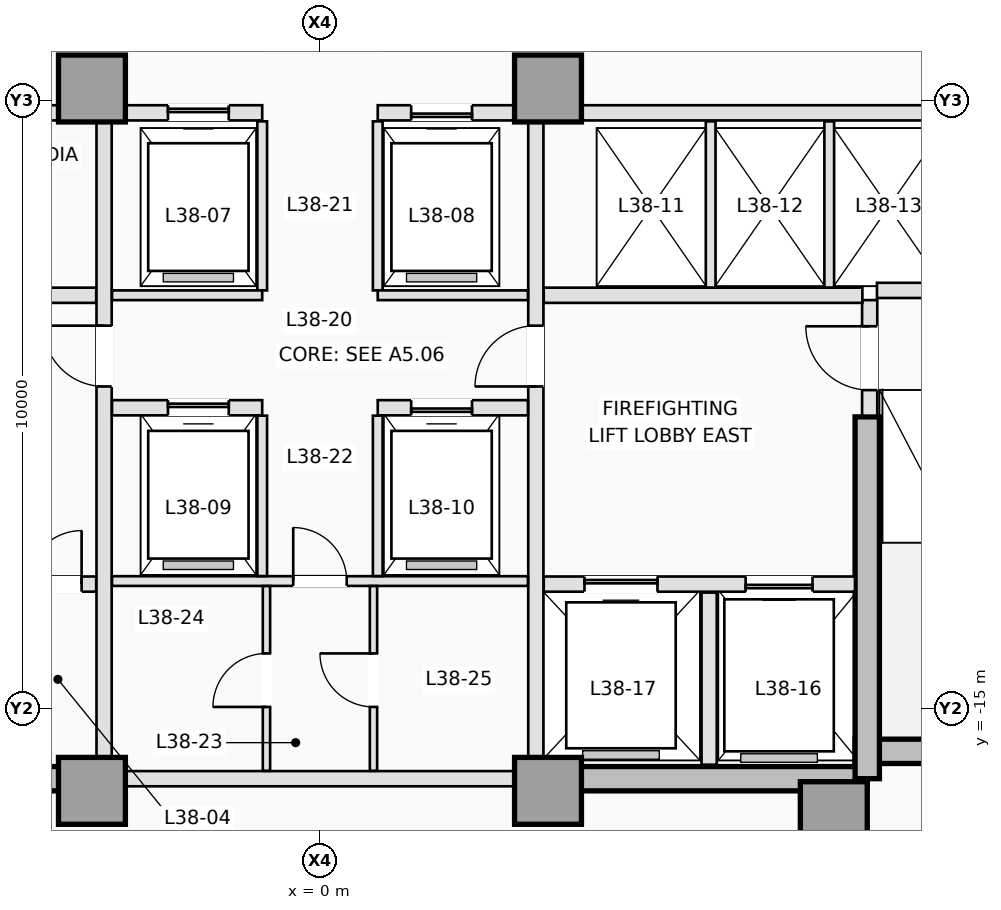
"""IFC4 building model, lengths in metres.
Left out: names, types, materials, properties, quantities, classifications, styles, units other than length and angle.
Written with IfcOpenShell. Run it as: python <this file> out.ifc"""

import sys

from ifc_helpers import new_model, si_unit, direction, frame, frame_2d, origin, origin_2d, place, context, subcontext, project, spatial, rectangle, extrude, element, fill, save


model = new_model("IFC4")
c1 = context("Model", 3, precision=1e-05, world=origin(), true_north=direction((0.0, 1.0)))
c2 = subcontext(c1, "Body", "Model", "MODEL_VIEW")
j1 = project(units=[si_unit("LENGTHUNIT", "METRE"), si_unit("PLANEANGLEUNIT", "RADIAN")], contexts=[c1])
p1 = place(None, origin())
s1 = spatial("IfcSite", under=j1, at=p1, CompositionType="ELEMENT")
p2 = place(p1, origin())
s2 = spatial("IfcBuilding", under=s1, at=p2, CompositionType="ELEMENT")
p3 = place(p2, frame((0.0, 0.0, 140.5)))
s3 = spatial("IfcBuildingStorey", under=s2, at=p3, CompositionType="ELEMENT", Elevation=140.5)
for number, where, z_axis, x_axis in (
    (1, (-9.0, -16.15, 0.0), (0.0, 0.0, 1.0), (1.0, 0.0, 0.0)),
    (2, (3.75, -16.15, 0.0), (0.0, 0.0, 1.0), (1.0, 0.0, 0.0)),
):
    element("IfcWall", number, at=place(p3, frame(where, z_axis=z_axis, x_axis=x_axis)), inside=s3, PredefinedType="SHEAR", context=c2, shape_type="SweptSolid", body=[
        extrude(rectangle(XDim=5.25, YDim=0.4, at=frame_2d((2.625, 0.0))), origin(), (0.0, 0.0, 1.0), 3.5),
    ])
p4 = place(p3, frame((8.8, -15.7, 0.0), z_axis=(0.0, 0.0, 1.0), x_axis=(1.0, 0.0, 0.0)))
e3 = element("IfcWall", 3, at=p4, inside=s3, PredefinedType="SHEAR", context=c2, shape_type="SweptSolid", body=[
    extrude(rectangle(XDim=3.8, YDim=0.4, at=frame_2d((1.9, 0.0))), origin(), (0.0, 0.0, 1.0), 3.5),
])
p5 = place(p3, frame((9.0, -16.15, 0.0), z_axis=(0.0, 0.0, 1.0), x_axis=(0.0, 1.0, 0.0)))
e4 = element("IfcWall", 4, at=p5, inside=s3, PredefinedType="SHEAR", context=c2, shape_type="SweptSolid", body=[
    extrude(rectangle(XDim=5.95, YDim=0.4, at=frame_2d((2.975, 0.0))), origin(), (0.0, 0.0, 1.0), 3.5),
])
for number, where, z_axis, x_axis in (
    (5, (-3.75, -16.35, 0.0), (0.0, 0.0, 1.0), (1.0, 0.0, 0.0)),
    (6, (3.75, -16.35, 0.0), (0.0, 0.0, 1.0), (1.0, 0.0, 0.0)),
    (7, (8.45, -16.75, 0.0), (0.0, 0.0, 1.0), (1.0, 0.0, 0.0)),
    (8, (-3.75, -4.8, 0.0), (0.0, 0.0, 1.0), (1.0, 0.0, 0.0)),
    (9, (3.75, -4.8, 0.0), (0.0, 0.0, 1.0), (1.0, 0.0, 0.0)),
):
    element("IfcColumn", number, at=place(p3, frame(where, z_axis=z_axis, x_axis=x_axis)), inside=s3, PredefinedType="COLUMN", context=c2, shape_type="SweptSolid", body=[
        extrude(rectangle(XDim=1.1, YDim=1.1, at=origin_2d()), origin(), (0.0, 0.0, 1.0), 3.5),
    ])
p6 = place(p3, frame((9.04, -10.18, 0.0), z_axis=(0.0, 0.0, 1.0), x_axis=(0.0, 1.0, 0.0)))
e10 = element("IfcWall", 10, at=p6, inside=s3, PredefinedType="PARTITIONING", context=c2, shape_type="SweptSolid", body=[
    extrude(rectangle(XDim=1.9, YDim=0.25, at=frame_2d((0.95, 0.0))), origin(), (0.0, 0.0, 1.0), 3.25),
])
p7 = place(p6, frame((0.42, 0.0, 0.0)))
e11 = element("IfcOpeningElement", 11, at=p7, cuts=e10, PredefinedType="OPENING", context=c2, shape_type="SweptSolid", body=[
    extrude(rectangle(XDim=1.05, YDim=2.15, at=frame_2d((0.525, 1.075))), frame((0.0, 0.135, 0.0), z_axis=(0.0, -1.0, 0.0), x_axis=(1.0, 0.0, 0.0)), (0.0, 0.0, 1.0), 0.27),
])
p8 = place(p3, frame((9.16, -8.12, 0.0), z_axis=(0.0, 0.0, 1.0), x_axis=(1.0, 0.0, 0.0)))
e12 = element("IfcWall", 12, at=p8, inside=s3, PredefinedType="PARTITIONING", context=c2, shape_type="SweptSolid", body=[
    extrude(rectangle(XDim=3.22, YDim=0.25, at=frame_2d((1.61, 0.0))), origin(), (0.0, 0.0, 1.0), 3.25),
])
p9 = place(p3, frame((-8.798, -12.95, 0.0), z_axis=(0.0, 0.0, 1.0), x_axis=(1.0, 0.0, 0.0)))
e13 = element("IfcWall", 13, at=p9, inside=s3, PredefinedType="PARTITIONING", context=c2, shape_type="SweptSolid", body=[
    extrude(rectangle(XDim=5.118, YDim=0.25, at=frame_2d((2.559, 0.0))), origin(), (0.0, 0.0, 1.0), 3.25),
])
p10 = place(p9, frame((0.698, 0.0, 0.0)))
e14 = element("IfcOpeningElement", 14, at=p10, cuts=e13, PredefinedType="OPENING", context=c2, shape_type="SweptSolid", body=[
    extrude(rectangle(XDim=1.1, YDim=2.15, at=frame_2d((0.55, 1.075))), frame((0.0, 0.135, 0.0), z_axis=(0.0, -1.0, 0.0), x_axis=(1.0, 0.0, 0.0)), (0.0, 0.0, 1.0), 0.27),
])
p11 = place(p9, frame((2.598, 0.0, 0.0)))
e15 = element("IfcOpeningElement", 15, at=p11, cuts=e13, PredefinedType="OPENING", context=c2, shape_type="SweptSolid", body=[
    extrude(rectangle(XDim=0.88, YDim=2.1, at=frame_2d((0.44, 1.05))), frame((0.0, 0.135, 0.0), z_axis=(0.0, -1.0, 0.0), x_axis=(1.0, 0.0, 0.0)), (0.0, 0.0, 1.0), 0.27),
])
p12 = place(p9, frame((3.998, 0.0, 0.0)))
e16 = element("IfcOpeningElement", 16, at=p12, cuts=e13, PredefinedType="OPENING", context=c2, shape_type="SweptSolid", body=[
    extrude(rectangle(XDim=0.88, YDim=2.1, at=frame_2d((0.44, 1.05))), frame((0.0, 0.135, 0.0), z_axis=(0.0, -1.0, 0.0), x_axis=(1.0, 0.0, 0.0)), (0.0, 0.0, 1.0), 0.27),
])
p13 = place(p3, frame((3.68, -12.95, 0.0), z_axis=(0.0, 0.0, 1.0), x_axis=(1.0, 0.0, 0.0)))
e17 = element("IfcWall", 17, at=p13, inside=s3, PredefinedType="PARTITIONING", context=c2, shape_type="SweptSolid", body=[
    extrude(rectangle(XDim=5.118, YDim=0.25, at=frame_2d((2.559, 0.0))), origin(), (0.0, 0.0, 1.0), 3.25),
])
p14 = place(p13, frame((3.32, 0.0, 0.0)))
e18 = element("IfcOpeningElement", 18, at=p14, cuts=e17, PredefinedType="OPENING", context=c2, shape_type="SweptSolid", body=[
    extrude(rectangle(XDim=1.1, YDim=2.15, at=frame_2d((0.55, 1.075))), frame((0.0, 0.135, 0.0), z_axis=(0.0, -1.0, 0.0), x_axis=(1.0, 0.0, 0.0)), (0.0, 0.0, 1.0), 0.27),
])
p15 = place(p13, frame((0.67, 0.0, 0.0)))
e19 = element("IfcOpeningElement", 19, at=p15, cuts=e17, PredefinedType="OPENING", context=c2, shape_type="SweptSolid", body=[
    extrude(rectangle(XDim=1.2, YDim=2.15, at=frame_2d((0.6, 1.075))), frame((0.0, 0.135, 0.0), z_axis=(0.0, -1.0, 0.0), x_axis=(1.0, 0.0, 0.0)), (0.0, 0.0, 1.0), 0.27),
])
p16 = place(p3, frame((6.4, -15.92, 0.0), z_axis=(0.0, 0.0, 1.0), x_axis=(0.0, 1.0, 0.0)))
e20 = element("IfcWall", 20, at=p16, inside=s3, PredefinedType="PARTITIONING", context=c2, shape_type="SweptSolid", body=[
    extrude(rectangle(XDim=2.83, YDim=0.25, at=frame_2d((1.415, 0.0))), origin(), (0.0, 0.0, 1.0), 3.25),
])
for number, where, z_axis, x_axis in (
    (21, (-8.92, -8.2, 0.0), (0.0, 0.0, 1.0), (1.0, 0.0, 0.0)),
    (22, (3.68, -8.2, 0.0), (0.0, 0.0, 1.0), (1.0, 0.0, 0.0)),
):
    element("IfcWall", number, at=place(p3, frame(where, z_axis=z_axis, x_axis=x_axis)), inside=s3, PredefinedType="PARTITIONING", context=c2, shape_type="SweptSolid", body=[
        extrude(rectangle(XDim=5.24, YDim=0.25, at=frame_2d((2.62, 0.0))), origin(), (0.0, 0.0, 1.0), 3.25),
    ])
p17 = place(p3, frame((-3.55, -15.798, 0.0), z_axis=(0.0, 0.0, 1.0), x_axis=(0.0, 1.0, 0.0)))
e23 = element("IfcWall", 23, at=p17, inside=s3, PredefinedType="PARTITIONING", context=c2, shape_type="SweptSolid", body=[
    extrude(rectangle(XDim=10.446, YDim=0.25, at=frame_2d((5.223, 0.0))), origin(), (0.0, 0.0, 1.0), 3.25),
])
p18 = place(p17, frame((6.098, 0.0, 0.0)))
e24 = element("IfcOpeningElement", 24, at=p18, cuts=e23, PredefinedType="OPENING", context=c2, shape_type="SweptSolid", body=[
    extrude(rectangle(XDim=1.0, YDim=2.15, at=frame_2d((0.5, 1.075))), frame((0.0, 0.135, 0.0), z_axis=(0.0, -1.0, 0.0), x_axis=(1.0, 0.0, 0.0)), (0.0, 0.0, 1.0), 0.27),
])
p19 = place(p3, frame((3.55, -15.798, 0.0), z_axis=(0.0, 0.0, 1.0), x_axis=(0.0, 1.0, 0.0)))
e25 = element("IfcWall", 25, at=p19, inside=s3, PredefinedType="PARTITIONING", context=c2, shape_type="SweptSolid", body=[
    extrude(rectangle(XDim=10.446, YDim=0.25, at=frame_2d((5.223, 0.0))), origin(), (0.0, 0.0, 1.0), 3.25),
])
p20 = place(p19, frame((6.098, 0.0, 0.0)))
e26 = element("IfcOpeningElement", 26, at=p20, cuts=e25, PredefinedType="OPENING", context=c2, shape_type="SweptSolid", body=[
    extrude(rectangle(XDim=1.0, YDim=2.15, at=frame_2d((0.5, 1.075))), frame((0.0, 0.135, 0.0), z_axis=(0.0, -1.0, 0.0), x_axis=(1.0, 0.0, 0.0)), (0.0, 0.0, 1.0), 0.27),
])
p21 = place(p3, frame((-12.398, -5.2, 0.0), z_axis=(0.0, 0.0, 1.0), x_axis=(1.0, 0.0, 0.0)))
e27 = element("IfcWall", 27, at=p21, inside=s3, PredefinedType="PARTITIONING", context=c2, shape_type="SweptSolid", body=[
    extrude(rectangle(XDim=8.096, YDim=0.25, at=frame_2d((4.048, 0.0))), origin(), (0.0, 0.0, 1.0), 3.25),
])
p22 = place(p21, frame((2.968, 0.0, 0.0)))
e28 = element("IfcOpeningElement", 28, at=p22, cuts=e27, PredefinedType="OPENING", context=c2, shape_type="SweptSolid", body=[
    extrude(rectangle(XDim=0.92, YDim=2.12, at=frame_2d((0.46, 1.06))), frame((0.0, 0.135, 0.0), z_axis=(0.0, -1.0, 0.0), x_axis=(1.0, 0.0, 0.0)), (0.0, 0.0, 1.0), 0.27),
])
p23 = place(p21, frame((6.068, 0.0, 0.0)))
e29 = element("IfcOpeningElement", 29, at=p23, cuts=e27, PredefinedType="OPENING", context=c2, shape_type="SweptSolid", body=[
    extrude(rectangle(XDim=0.92, YDim=2.12, at=frame_2d((0.46, 1.06))), frame((0.0, 0.135, 0.0), z_axis=(0.0, -1.0, 0.0), x_axis=(1.0, 0.0, 0.0)), (0.0, 0.0, 1.0), 0.27),
])
p24 = place(p3, frame((4.302, -5.2, 0.0), z_axis=(0.0, 0.0, 1.0), x_axis=(1.0, 0.0, 0.0)))
e30 = element("IfcWall", 30, at=p24, inside=s3, PredefinedType="PARTITIONING", context=c2, shape_type="SweptSolid", body=[
    extrude(rectangle(XDim=8.096, YDim=0.25, at=frame_2d((4.048, 0.0))), origin(), (0.0, 0.0, 1.0), 3.25),
])
p25 = place(p3, frame((-3.198, -5.2, 0.0), z_axis=(0.0, 0.0, 1.0), x_axis=(1.0, 0.0, 0.0)))
e31 = element("IfcWall", 31, at=p25, inside=s3, PredefinedType="PARTITIONING", context=c2, shape_type="SweptSolid", body=[
    extrude(rectangle(XDim=2.248, YDim=0.25, at=frame_2d((1.124, 0.0))), origin(), (0.0, 0.0, 1.0), 3.25),
])
p26 = place(p25, frame((0.698, 0.0, 0.0)))
e32 = element("IfcOpeningElement", 32, at=p26, cuts=e31, PredefinedType="OPENING", context=c2, shape_type="SweptSolid", body=[
    extrude(rectangle(XDim=1.0, YDim=2.15, at=frame_2d((0.5, 1.075))), frame((0.0, 0.135, 0.0), z_axis=(0.0, -1.0, 0.0), x_axis=(1.0, 0.0, 0.0)), (0.0, 0.0, 1.0), 0.27),
])
p27 = place(p3, frame((0.95, -5.2, 0.0), z_axis=(0.0, 0.0, 1.0), x_axis=(1.0, 0.0, 0.0)))
e33 = element("IfcWall", 33, at=p27, inside=s3, PredefinedType="PARTITIONING", context=c2, shape_type="SweptSolid", body=[
    extrude(rectangle(XDim=2.248, YDim=0.25, at=frame_2d((1.124, 0.0))), origin(), (0.0, 0.0, 1.0), 3.25),
])
p28 = place(p27, frame((0.55, 0.0, 0.0)))
e34 = element("IfcOpeningElement", 34, at=p28, cuts=e33, PredefinedType="OPENING", context=c2, shape_type="SweptSolid", body=[
    extrude(rectangle(XDim=1.0, YDim=2.15, at=frame_2d((0.5, 1.075))), frame((0.0, 0.135, 0.0), z_axis=(0.0, -1.0, 0.0), x_axis=(1.0, 0.0, 0.0)), (0.0, 0.0, 1.0), 0.27),
])
for number, where, z_axis, x_axis in (
    (35, (6.425, -8.073, 0.0), (0.0, 0.0, 1.0), (0.0, 1.0, 0.0)),
    (36, (8.375, -8.073, 0.0), (0.0, 0.0, 1.0), (0.0, 1.0, 0.0)),
):
    element("IfcWall", number, at=place(p3, frame(where, z_axis=z_axis, x_axis=x_axis)), inside=s3, PredefinedType="PARTITIONING", context=c2, shape_type="SweptSolid", body=[
        extrude(rectangle(XDim=2.733, YDim=0.16, at=frame_2d((1.366, 0.0))), origin(), (0.0, 0.0, 1.0), 3.25),
    ])
p29 = place(p3, frame((-3.198, -16.15, 0.0), z_axis=(0.0, 0.0, 1.0), x_axis=(1.0, 0.0, 0.0)))
e37 = element("IfcWall", 37, at=p29, inside=s3, PredefinedType="PARTITIONING", context=c2, shape_type="SweptSolid", body=[
    extrude(rectangle(XDim=6.396, YDim=0.25, at=frame_2d((3.198, 0.0))), origin(), (0.0, 0.0, 1.0), 2.45),
])
for number, where, z_axis, x_axis in (
    (38, (-0.95, -8.12, 0.0), (0.0, 0.0, 1.0), (0.0, 1.0, 0.0)),
    (39, (0.95, -8.12, 0.0), (0.0, 0.0, 1.0), (0.0, 1.0, 0.0)),
):
    element("IfcWall", number, at=place(p3, frame(where, z_axis=z_axis, x_axis=x_axis)), inside=s3, PredefinedType="PARTITIONING", context=c2, shape_type="SweptSolid", body=[
        extrude(rectangle(XDim=2.78, YDim=0.16, at=frame_2d((1.39, 0.0))), origin(), (0.0, 0.0, 1.0), 3.25),
    ])
for number, where, z_axis, x_axis in (
    (40, (-3.42, -8.2, 0.0), (0.0, 0.0, 1.0), (1.0, 0.0, 0.0)),
    (41, (0.95, -8.2, 0.0), (0.0, 0.0, 1.0), (1.0, 0.0, 0.0)),
):
    element("IfcWall", number, at=place(p3, frame(where, z_axis=z_axis, x_axis=x_axis)), inside=s3, PredefinedType="PARTITIONING", context=c2, shape_type="SweptSolid", body=[
        extrude(rectangle(XDim=2.47, YDim=0.16, at=frame_2d((1.235, 0.0))), origin(), (0.0, 0.0, 1.0), 3.25),
    ])
p30 = place(p3, frame((-3.42, -10.05, 0.0), z_axis=(0.0, 0.0, 1.0), x_axis=(1.0, 0.0, 0.0)))
e42 = element("IfcWall", 42, at=p30, inside=s3, PredefinedType="PARTITIONING", context=c2, shape_type="SweptSolid", body=[
    extrude(rectangle(XDim=2.47, YDim=0.25, at=frame_2d((1.235, 0.0))), origin(), (0.0, 0.0, 1.0), 3.25),
])
p31 = place(p30, frame((0.92, 0.0, 0.0)))
e43 = element("IfcOpeningElement", 43, at=p31, cuts=e42, PredefinedType="OPENING", context=c2, shape_type="SweptSolid", body=[
    extrude(rectangle(XDim=1.0, YDim=2.15, at=frame_2d((0.5, 1.075))), frame((0.0, 0.135, 0.0), z_axis=(0.0, -1.0, 0.0), x_axis=(1.0, 0.0, 0.0)), (0.0, 0.0, 1.0), 0.27),
])
p32 = place(p3, frame((0.95, -10.05, 0.0), z_axis=(0.0, 0.0, 1.0), x_axis=(1.0, 0.0, 0.0)))
e44 = element("IfcWall", 44, at=p32, inside=s3, PredefinedType="PARTITIONING", context=c2, shape_type="SweptSolid", body=[
    extrude(rectangle(XDim=2.47, YDim=0.25, at=frame_2d((1.235, 0.0))), origin(), (0.0, 0.0, 1.0), 3.25),
])
p33 = place(p32, frame((0.55, 0.0, 0.0)))
e45 = element("IfcOpeningElement", 45, at=p33, cuts=e44, PredefinedType="OPENING", context=c2, shape_type="SweptSolid", body=[
    extrude(rectangle(XDim=1.0, YDim=2.15, at=frame_2d((0.5, 1.075))), frame((0.0, 0.135, 0.0), z_axis=(0.0, -1.0, 0.0), x_axis=(1.0, 0.0, 0.0)), (0.0, 0.0, 1.0), 0.27),
])
p34 = place(p3, frame((-3.42, -12.9, 0.0), z_axis=(0.0, 0.0, 1.0), x_axis=(1.0, 0.0, 0.0)))
e46 = element("IfcWall", 46, at=p34, inside=s3, PredefinedType="PARTITIONING", context=c2, shape_type="SweptSolid", body=[
    extrude(rectangle(XDim=6.84, YDim=0.16, at=frame_2d((3.42, 0.0))), origin(), (0.0, 0.0, 1.0), 3.25),
])
p35 = place(p34, frame((2.98, 0.0, 0.0)))
e47 = element("IfcOpeningElement", 47, at=p35, cuts=e46, PredefinedType="OPENING", context=c2, shape_type="SweptSolid", body=[
    extrude(rectangle(XDim=0.88, YDim=2.12, at=frame_2d((0.44, 1.06))), frame((0.0, 0.09, 0.0), z_axis=(0.0, -1.0, 0.0), x_axis=(1.0, 0.0, 0.0)), (0.0, 0.0, 1.0), 0.18),
])
for number, where, z_axis, x_axis in (
    (48, (-0.95, -12.818, 0.0), (0.0, 0.0, 1.0), (0.0, 1.0, 0.0)),
    (49, (0.95, -12.818, 0.0), (0.0, 0.0, 1.0), (0.0, 1.0, 0.0)),
):
    element("IfcWall", number, at=place(p3, frame(where, z_axis=z_axis, x_axis=x_axis)), inside=s3, PredefinedType="PARTITIONING", context=c2, shape_type="SweptSolid", body=[
        extrude(rectangle(XDim=2.638, YDim=0.16, at=frame_2d((1.319, 0.0))), origin(), (0.0, 0.0, 1.0), 3.25),
    ])
p36 = place(p3, frame((-0.88, -16.02, 0.0), z_axis=(0.0, 0.0, 1.0), x_axis=(0.0, 1.0, 0.0)))
e50 = element("IfcWall", 50, at=p36, inside=s3, PredefinedType="PARTITIONING", context=c2, shape_type="SweptSolid", body=[
    extrude(rectangle(XDim=3.038, YDim=0.12, at=frame_2d((1.519, 0.0))), origin(), (0.0, 0.0, 1.0), 3.25),
])
p37 = place(p36, frame((1.05, 0.0, 0.0)))
e51 = element("IfcOpeningElement", 51, at=p37, cuts=e50, PredefinedType="OPENING", context=c2, shape_type="SweptSolid", body=[
    extrude(rectangle(XDim=0.88, YDim=2.12, at=frame_2d((0.44, 1.06))), frame((0.0, 0.07, 0.0), z_axis=(0.0, -1.0, 0.0), x_axis=(1.0, 0.0, 0.0)), (0.0, 0.0, 1.0), 0.14),
])
p38 = place(p3, frame((0.88, -16.02, 0.0), z_axis=(0.0, 0.0, 1.0), x_axis=(0.0, 1.0, 0.0)))
e52 = element("IfcWall", 52, at=p38, inside=s3, PredefinedType="PARTITIONING", context=c2, shape_type="SweptSolid", body=[
    extrude(rectangle(XDim=3.038, YDim=0.12, at=frame_2d((1.519, 0.0))), origin(), (0.0, 0.0, 1.0), 3.25),
])
p39 = place(p38, frame((1.05, 0.0, 0.0)))
e53 = element("IfcOpeningElement", 53, at=p39, cuts=e52, PredefinedType="OPENING", context=c2, shape_type="SweptSolid", body=[
    extrude(rectangle(XDim=0.88, YDim=2.12, at=frame_2d((0.44, 1.06))), frame((0.0, 0.07, 0.0), z_axis=(0.0, -1.0, 0.0), x_axis=(1.0, 0.0, 0.0)), (0.0, 0.0, 1.0), 0.14),
])
p40 = place(p26, origin())
e54 = element("IfcDoor", 54, at=p40, inside=s3, OperationType="SLIDING_TO_LEFT", PredefinedType="DOOR", context=c2, shape_type="SweptSolid", body=[
    extrude(rectangle(XDim=1.0, YDim=2.15, at=frame_2d((0.5, 1.075))), frame((0.0, 0.025, 0.0), z_axis=(0.0, -1.0, 0.0), x_axis=(1.0, 0.0, 0.0)), (0.0, 0.0, 1.0), 0.05),
])
fill(e32, e54)
p41 = place(p28, origin())
e55 = element("IfcDoor", 55, at=p41, inside=s3, OperationType="SLIDING_TO_RIGHT", PredefinedType="DOOR", context=c2, shape_type="SweptSolid", body=[
    extrude(rectangle(XDim=1.0, YDim=2.15, at=frame_2d((0.5, 1.075))), frame((0.0, 0.025, 0.0), z_axis=(0.0, -1.0, 0.0), x_axis=(1.0, 0.0, 0.0)), (0.0, 0.0, 1.0), 0.05),
])
fill(e34, e55)
p42 = place(p14, origin())
e56 = element("IfcDoor", 56, at=p42, inside=s3, OperationType="SLIDING_TO_RIGHT", PredefinedType="DOOR", context=c2, shape_type="SweptSolid", body=[
    extrude(rectangle(XDim=1.1, YDim=2.15, at=frame_2d((0.55, 1.075))), frame((0.0, 0.025, 0.0), z_axis=(0.0, -1.0, 0.0), x_axis=(1.0, 0.0, 0.0)), (0.0, 0.0, 1.0), 0.05),
])
fill(e18, e56)
p43 = place(p15, origin())
e57 = element("IfcDoor", 57, at=p43, inside=s3, OperationType="SLIDING_TO_LEFT", PredefinedType="DOOR", context=c2, shape_type="SweptSolid", body=[
    extrude(rectangle(XDim=1.2, YDim=2.15, at=frame_2d((0.6, 1.075))), frame((0.0, 0.025, 0.0), z_axis=(0.0, -1.0, 0.0), x_axis=(1.0, 0.0, 0.0)), (0.0, 0.0, 1.0), 0.05),
])
fill(e19, e57)
p44 = place(p31, origin())
e58 = element("IfcDoor", 58, at=p44, inside=s3, OperationType="SLIDING_TO_LEFT", PredefinedType="DOOR", context=c2, shape_type="SweptSolid", body=[
    extrude(rectangle(XDim=1.0, YDim=2.15, at=frame_2d((0.5, 1.075))), frame((0.0, 0.025, 0.0), z_axis=(0.0, -1.0, 0.0), x_axis=(1.0, 0.0, 0.0)), (0.0, 0.0, 1.0), 0.05),
])
fill(e43, e58)
p45 = place(p33, origin())
e59 = element("IfcDoor", 59, at=p45, inside=s3, OperationType="SLIDING_TO_RIGHT", PredefinedType="DOOR", context=c2, shape_type="SweptSolid", body=[
    extrude(rectangle(XDim=1.0, YDim=2.15, at=frame_2d((0.5, 1.075))), frame((0.0, 0.025, 0.0), z_axis=(0.0, -1.0, 0.0), x_axis=(1.0, 0.0, 0.0)), (0.0, 0.0, 1.0), 0.05),
])
fill(e45, e59)
p46 = place(p7, origin())
e60 = element("IfcDoor", 60, at=p46, inside=s3, OperationType="SINGLE_SWING_RIGHT", PredefinedType="DOOR", context=c2, shape_type="SweptSolid", body=[
    extrude(rectangle(XDim=1.05, YDim=2.15, at=frame_2d((0.525, 1.075))), frame((0.0, 0.025, 0.0), z_axis=(0.0, -1.0, 0.0), x_axis=(1.0, 0.0, 0.0)), (0.0, 0.0, 1.0), 0.05),
])
fill(e11, e60)
p47 = place(p12, origin())
e61 = element("IfcDoor", 61, at=p47, inside=s3, OperationType="SINGLE_SWING_RIGHT", PredefinedType="TRAPDOOR", context=c2, shape_type="SweptSolid", body=[
    extrude(rectangle(XDim=0.88, YDim=2.1, at=frame_2d((0.44, 1.05))), frame((0.0, 0.025, 0.0), z_axis=(0.0, -1.0, 0.0), x_axis=(1.0, 0.0, 0.0)), (0.0, 0.0, 1.0), 0.05),
])
fill(e16, e61)
p48 = place(p18, origin())
e62 = element("IfcDoor", 62, at=p48, inside=s3, OperationType="SINGLE_SWING_RIGHT", PredefinedType="DOOR", context=c2, shape_type="SweptSolid", body=[
    extrude(rectangle(XDim=1.0, YDim=2.15, at=frame_2d((0.5, 1.075))), frame((0.0, 0.025, 0.0), z_axis=(0.0, -1.0, 0.0), x_axis=(1.0, 0.0, 0.0)), (0.0, 0.0, 1.0), 0.05),
])
fill(e24, e62)
p49 = place(p20, origin())
e63 = element("IfcDoor", 63, at=p49, inside=s3, OperationType="SINGLE_SWING_LEFT", PredefinedType="DOOR", context=c2, shape_type="SweptSolid", body=[
    extrude(rectangle(XDim=1.0, YDim=2.15, at=frame_2d((0.5, 1.075))), frame((0.0, 0.025, 0.0), z_axis=(0.0, -1.0, 0.0), x_axis=(1.0, 0.0, 0.0)), (0.0, 0.0, 1.0), 0.05),
])
fill(e26, e63)
p50 = place(p35, origin())
e64 = element("IfcDoor", 64, at=p50, inside=s3, OperationType="SINGLE_SWING_LEFT", PredefinedType="DOOR", context=c2, shape_type="SweptSolid", body=[
    extrude(rectangle(XDim=0.88, YDim=2.12, at=frame_2d((0.44, 1.06))), frame((0.0, 0.025, 0.0), z_axis=(0.0, -1.0, 0.0), x_axis=(1.0, 0.0, 0.0)), (0.0, 0.0, 1.0), 0.05),
])
fill(e47, e64)
p51 = place(p37, origin())
e65 = element("IfcDoor", 65, at=p51, inside=s3, OperationType="SINGLE_SWING_LEFT", PredefinedType="DOOR", context=c2, shape_type="SweptSolid", body=[
    extrude(rectangle(XDim=0.88, YDim=2.12, at=frame_2d((0.44, 1.06))), frame((0.0, 0.025, 0.0), z_axis=(0.0, -1.0, 0.0), x_axis=(1.0, 0.0, 0.0)), (0.0, 0.0, 1.0), 0.05),
])
fill(e51, e65)
p52 = place(p39, origin())
e66 = element("IfcDoor", 66, at=p52, inside=s3, OperationType="SINGLE_SWING_RIGHT", PredefinedType="DOOR", context=c2, shape_type="SweptSolid", body=[
    extrude(rectangle(XDim=0.88, YDim=2.12, at=frame_2d((0.44, 1.06))), frame((0.0, 0.025, 0.0), z_axis=(0.0, -1.0, 0.0), x_axis=(1.0, 0.0, 0.0)), (0.0, 0.0, 1.0), 0.05),
])
fill(e53, e66)
save(model, sys.argv[1])
